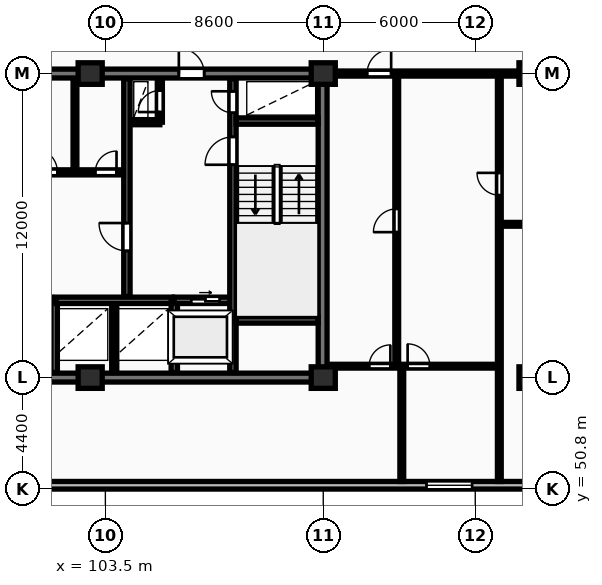
"""IFC4 building model, lengths in metres.
Left out: names, types, materials, properties, quantities, classifications, styles, units other than length and angle.
Written with IfcOpenShell. Run it as: python <this file> out.ifc"""

import sys

from ifc_helpers import new_model, si_unit, direction, frame, frame_2d, origin, origin_2d, place, context, subcontext, project, spatial, rectangle, extrude, element, fill, save


model = new_model("IFC4")
c1 = context("Model", 3, precision=1e-05, world=origin(), true_north=direction((0.0, 1.0)))
c2 = subcontext(c1, "Body", "Model", "MODEL_VIEW")
j1 = project(units=[si_unit("LENGTHUNIT", "METRE"), si_unit("PLANEANGLEUNIT", "RADIAN")], contexts=[c1])
p1 = place(None, origin())
s1 = spatial("IfcSite", under=j1, at=p1, CompositionType="ELEMENT")
p2 = place(p1, origin())
s2 = spatial("IfcBuilding", under=s1, at=p2, CompositionType="ELEMENT")
p3 = place(p2, frame((0.0, 0.0, 80.8)))
s3 = spatial("IfcBuildingStorey", under=s2, at=p3, CompositionType="ELEMENT", Elevation=80.8)
for number, where, z_axis, x_axis in (
    (1, (102.9, 55.2, 0.0), (0.0, 0.0, 1.0), (1.0, 0.0, 0.0)),
    (2, (102.9, 67.2, 0.0), (0.0, 0.0, 1.0), (1.0, 0.0, 0.0)),
    (3, (112.1, 55.2, 0.0), (0.0, 0.0, 1.0), (1.0, 0.0, 0.0)),
    (4, (112.1, 67.2, 0.0), (0.0, 0.0, 1.0), (1.0, 0.0, 0.0)),
    (5, (120.3, 55.2, 0.0), (0.0, 0.0, 1.0), (1.0, 0.0, 0.0)),
    (6, (120.3, 67.2, 0.0), (0.0, 0.0, 1.0), (1.0, 0.0, 0.0)),
):
    element("IfcColumn", number, at=place(p3, frame(where, z_axis=z_axis, x_axis=x_axis)), inside=s3, PredefinedType="COLUMN", context=c2, shape_type="SweptSolid", body=[
        extrude(rectangle(XDim=0.95, YDim=0.85, at=origin_2d()), origin(), (0.0, 0.0, 1.0), 3.25),
    ])
p4 = place(p3, frame((57.6, 50.95, 0.0), z_axis=(0.0, 0.0, 1.0), x_axis=(1.0, 0.0, 0.0)))
e7 = element("IfcWall", 7, at=p4, inside=s3, PredefinedType="STANDARD", context=c2, shape_type="SweptSolid", body=[
    extrude(rectangle(XDim=73.0, YDim=0.3, at=frame_2d((36.5, 0.0))), origin(), (0.0, 0.0, 1.0), 2.97),
])
p5 = place(p4, frame((15.225, 0.0, 0.85)))
e8 = element("IfcOpeningElement", 8, at=p5, cuts=e7, PredefinedType="OPENING", context=c2, shape_type="SweptSolid", body=[
    extrude(rectangle(XDim=1.8, YDim=1.8, at=frame_2d((0.9, 0.9))), frame((0.0, 0.16, 0.0), z_axis=(0.0, -1.0, 0.0), x_axis=(1.0, 0.0, 0.0)), (0.0, 0.0, 1.0), 0.32),
])
p6 = place(p4, frame((58.575, 0.0, 0.85)))
e9 = element("IfcOpeningElement", 9, at=p6, cuts=e7, PredefinedType="OPENING", context=c2, shape_type="SweptSolid", body=[
    extrude(rectangle(XDim=1.8, YDim=1.8, at=frame_2d((0.9, 0.9))), frame((0.0, 0.16, 0.0), z_axis=(0.0, -1.0, 0.0), x_axis=(1.0, 0.0, 0.0)), (0.0, 0.0, 1.0), 0.32),
])
p7 = place(p3, frame((75.95, 55.2, 0.0), z_axis=(0.0, 0.0, 1.0), x_axis=(1.0, 0.0, 0.0)))
e10 = element("IfcWall", 10, at=p7, inside=s3, PredefinedType="SHEAR", context=c2, shape_type="SweptSolid", body=[
    extrude(rectangle(XDim=36.3, YDim=0.35, at=frame_2d((18.15, 0.0))), origin(), (0.0, 0.0, 1.0), 3.25),
])
p8 = place(p3, frame((112.075, 55.375, 0.0), z_axis=(0.0, 0.0, 1.0), x_axis=(0.0, 1.0, 0.0)))
e11 = element("IfcWall", 11, at=p8, inside=s3, PredefinedType="SHEAR", context=c2, shape_type="SweptSolid", body=[
    extrude(rectangle(XDim=11.65, YDim=0.35, at=frame_2d((5.825, 0.0))), origin(), (0.0, 0.0, 1.0), 3.25),
])
p9 = place(p3, frame((75.95, 67.2, 0.0), z_axis=(0.0, 0.0, 1.0), x_axis=(1.0, 0.0, 0.0)))
e12 = element("IfcWall", 12, at=p9, inside=s3, PredefinedType="SHEAR", context=c2, shape_type="SweptSolid", body=[
    extrude(rectangle(XDim=36.3, YDim=0.35, at=frame_2d((18.15, 0.0))), origin(), (0.0, 0.0, 1.0), 3.25),
])
p10 = place(p9, frame((5.25, 0.0, 0.0)))
e13 = element("IfcOpeningElement", 13, at=p10, cuts=e12, PredefinedType="OPENING", context=c2, shape_type="SweptSolid", body=[
    extrude(rectangle(XDim=1.0, YDim=2.15, at=frame_2d((0.5, 1.075))), frame((0.0, 0.185, 0.0), z_axis=(0.0, -1.0, 0.0), x_axis=(1.0, 0.0, 0.0)), (0.0, 0.0, 1.0), 0.37),
])
p11 = place(p9, frame((21.6, 0.0, 0.0)))
e14 = element("IfcOpeningElement", 14, at=p11, cuts=e12, PredefinedType="OPENING", context=c2, shape_type="SweptSolid", body=[
    extrude(rectangle(XDim=1.5, YDim=2.2, at=frame_2d((0.75, 1.1))), frame((0.0, 0.185, 0.0), z_axis=(0.0, -1.0, 0.0), x_axis=(1.0, 0.0, 0.0)), (0.0, 0.0, 1.0), 0.37),
])
p12 = place(p9, frame((30.45, 0.0, 0.0)))
e15 = element("IfcOpeningElement", 15, at=p12, cuts=e12, PredefinedType="OPENING", context=c2, shape_type="SweptSolid", body=[
    extrude(rectangle(XDim=1.0, YDim=2.15, at=frame_2d((0.5, 1.075))), frame((0.0, 0.185, 0.0), z_axis=(0.0, -1.0, 0.0), x_axis=(1.0, 0.0, 0.0)), (0.0, 0.0, 1.0), 0.37),
])
p13 = place(p3, frame((101.48, 55.4, 0.0), z_axis=(0.0, 0.0, 1.0), x_axis=(0.0, 1.0, 0.0)))
e16 = element("IfcWall", 16, at=p13, inside=s3, PredefinedType="SHEAR", context=c2, shape_type="SweptSolid", body=[
    extrude(rectangle(XDim=2.85, YDim=0.25, at=frame_2d((1.425, 0.0))), origin(), (0.0, 0.0, 1.0), 3.25),
])
p14 = place(p3, frame((103.85, 55.4, 0.0), z_axis=(0.0, 0.0, 1.0), x_axis=(0.0, 1.0, 0.0)))
e17 = element("IfcWall", 17, at=p14, inside=s3, PredefinedType="PARTITIONING", context=c2, shape_type="SweptSolid", body=[
    extrude(rectangle(XDim=2.72, YDim=0.2, at=frame_2d((1.36, 0.0))), origin(), (0.0, 0.0, 1.0), 2.97),
])
p15 = place(p3, frame((101.55, 58.25, 0.0), z_axis=(0.0, 0.0, 1.0), x_axis=(1.0, 0.0, 0.0)))
e18 = element("IfcWall", 18, at=p15, inside=s3, PredefinedType="SHEAR", context=c2, shape_type="SweptSolid", body=[
    extrude(rectangle(XDim=4.6, YDim=0.25, at=frame_2d((2.3, 0.0))), origin(), (0.0, 0.0, 1.0), 3.25),
])
p16 = place(p3, frame((106.22, 55.4, 0.0), z_axis=(0.0, 0.0, 1.0), x_axis=(0.0, 1.0, 0.0)))
e19 = element("IfcWall", 19, at=p16, inside=s3, PredefinedType="SHEAR", context=c2, shape_type="SweptSolid", body=[
    extrude(rectangle(XDim=2.85, YDim=0.25, at=frame_2d((1.425, 0.0))), origin(), (0.0, 0.0, 1.0), 3.25),
])
p17 = place(p3, frame((106.22, 58.25, 0.0), z_axis=(0.0, 0.0, 1.0), x_axis=(1.0, 0.0, 0.0)))
e20 = element("IfcWall", 20, at=p17, inside=s3, PredefinedType="SHEAR", context=c2, shape_type="SweptSolid", body=[
    extrude(rectangle(XDim=2.46, YDim=0.25, at=frame_2d((1.23, 0.0))), origin(), (0.0, 0.0, 1.0), 3.25),
])
p18 = place(p17, frame((0.67, 0.0, 0.0)))
e21 = element("IfcOpeningElement", 21, at=p18, cuts=e20, PredefinedType="OPENING", context=c2, shape_type="SweptSolid", body=[
    extrude(rectangle(XDim=1.12, YDim=2.12, at=frame_2d((0.56, 1.06))), frame((0.0, 0.135, 0.0), z_axis=(0.0, -1.0, 0.0), x_axis=(1.0, 0.0, 0.0)), (0.0, 0.0, 1.0), 0.27),
])
p19 = place(p3, frame((102.3, 63.4, 0.0), z_axis=(0.0, 0.0, 1.0), x_axis=(0.0, 1.0, 0.0)))
e22 = element("IfcWall", 22, at=p19, inside=s3, PredefinedType="PARTITIONING", context=c2, shape_type="SweptSolid", body=[
    extrude(rectangle(XDim=3.6, YDim=0.15, at=frame_2d((1.8, 0.0))), origin(), (0.0, 0.0, 1.0), 2.97),
])
p20 = place(p3, frame((84.42, 63.3, 0.0), z_axis=(0.0, 0.0, 1.0), x_axis=(1.0, 0.0, 0.0)))
e23 = element("IfcWall", 23, at=p20, inside=s3, PredefinedType="PARTITIONING", context=c2, shape_type="SweptSolid", body=[
    extrude(rectangle(XDim=19.83, YDim=0.2, at=frame_2d((9.915, 0.0))), origin(), (0.0, 0.0, 1.0), 2.97),
])
p21 = place(p20, frame((1.15, 0.0, 0.0)))
e24 = element("IfcOpeningElement", 24, at=p21, cuts=e23, PredefinedType="OPENING", context=c2, shape_type="SweptSolid", body=[
    extrude(rectangle(XDim=0.85, YDim=2.05, at=frame_2d((0.425, 1.025))), frame((0.0, 0.11, 0.0), z_axis=(0.0, -1.0, 0.0), x_axis=(1.0, 0.0, 0.0)), (0.0, 0.0, 1.0), 0.22),
])
p22 = place(p20, frame((3.25, 0.0, 0.0)))
e25 = element("IfcOpeningElement", 25, at=p22, cuts=e23, PredefinedType="OPENING", context=c2, shape_type="SweptSolid", body=[
    extrude(rectangle(XDim=0.85, YDim=2.05, at=frame_2d((0.425, 1.025))), frame((0.0, 0.11, 0.0), z_axis=(0.0, -1.0, 0.0), x_axis=(1.0, 0.0, 0.0)), (0.0, 0.0, 1.0), 0.22),
])
p23 = place(p20, frame((13.08, 0.0, 0.0)))
e26 = element("IfcOpeningElement", 26, at=p23, cuts=e23, PredefinedType="OPENING", context=c2, shape_type="SweptSolid", body=[
    extrude(rectangle(XDim=1.5, YDim=2.2, at=frame_2d((0.75, 1.1))), frame((0.0, 0.11, 0.0), z_axis=(0.0, -1.0, 0.0), x_axis=(1.0, 0.0, 0.0)), (0.0, 0.0, 1.0), 0.22),
])
p24 = place(p20, frame((5.53, 0.0, 0.0)))
e27 = element("IfcOpeningElement", 27, at=p24, cuts=e23, PredefinedType="OPENING", context=c2, shape_type="SweptSolid", body=[
    extrude(rectangle(XDim=0.88, YDim=2.06, at=frame_2d((0.44, 1.03))), frame((0.0, 0.11, 0.0), z_axis=(0.0, -1.0, 0.0), x_axis=(1.0, 0.0, 0.0)), (0.0, 0.0, 1.0), 0.22),
])
p25 = place(p20, frame((7.68, 0.0, 0.0)))
e28 = element("IfcOpeningElement", 28, at=p25, cuts=e23, PredefinedType="OPENING", context=c2, shape_type="SweptSolid", body=[
    extrude(rectangle(XDim=0.88, YDim=2.06, at=frame_2d((0.44, 1.03))), frame((0.0, 0.11, 0.0), z_axis=(0.0, -1.0, 0.0), x_axis=(1.0, 0.0, 0.0)), (0.0, 0.0, 1.0), 0.22),
])
p26 = place(p20, frame((10.43, 0.0, 0.0)))
e29 = element("IfcOpeningElement", 29, at=p26, cuts=e23, PredefinedType="OPENING", context=c2, shape_type="SweptSolid", body=[
    extrude(rectangle(XDim=0.85, YDim=2.05, at=frame_2d((0.425, 1.025))), frame((0.0, 0.11, 0.0), z_axis=(0.0, -1.0, 0.0), x_axis=(1.0, 0.0, 0.0)), (0.0, 0.0, 1.0), 0.22),
])
p27 = place(p20, frame((16.23, 0.0, 0.0)))
e30 = element("IfcOpeningElement", 30, at=p27, cuts=e23, PredefinedType="OPENING", context=c2, shape_type="SweptSolid", body=[
    extrude(rectangle(XDim=0.96, YDim=2.1, at=frame_2d((0.48, 1.05))), frame((0.0, 0.11, 0.0), z_axis=(0.0, -1.0, 0.0), x_axis=(1.0, 0.0, 0.0)), (0.0, 0.0, 1.0), 0.22),
])
p28 = place(p20, frame((18.68, 0.0, 0.0)))
e31 = element("IfcOpeningElement", 31, at=p28, cuts=e23, PredefinedType="OPENING", context=c2, shape_type="SweptSolid", body=[
    extrude(rectangle(XDim=0.84, YDim=2.04, at=frame_2d((0.42, 1.02))), frame((0.0, 0.11, 0.0), z_axis=(0.0, -1.0, 0.0), x_axis=(1.0, 0.0, 0.0)), (0.0, 0.0, 1.0), 0.22),
])
p29 = place(p3, frame((104.45, 65.28, 0.0), z_axis=(0.0, 0.0, 1.0), x_axis=(1.0, 0.0, 0.0)))
e32 = element("IfcWall", 32, at=p29, inside=s3, PredefinedType="PARTITIONING", context=c2, shape_type="SweptSolid", body=[
    extrude(rectangle(XDim=1.2, YDim=0.2, at=frame_2d((0.6, 0.0))), origin(), (0.0, 0.0, 1.0), 2.97),
])
p30 = place(p3, frame((105.65, 65.28, 0.0), z_axis=(0.0, 0.0, 1.0), x_axis=(0.0, 1.0, 0.0)))
e33 = element("IfcWall", 33, at=p30, inside=s3, PredefinedType="PARTITIONING", context=c2, shape_type="SweptSolid", body=[
    extrude(rectangle(XDim=1.72, YDim=0.2, at=frame_2d((0.86, 0.0))), origin(), (0.0, 0.0, 1.0), 2.97),
])
p31 = place(p30, frame((0.4, 0.0, 0.0)))
e34 = element("IfcOpeningElement", 34, at=p31, cuts=e33, PredefinedType="OPENING", context=c2, shape_type="SweptSolid", body=[
    extrude(rectangle(XDim=0.85, YDim=2.05, at=frame_2d((0.425, 1.025))), frame((0.0, 0.11, 0.0), z_axis=(0.0, -1.0, 0.0), x_axis=(1.0, 0.0, 0.0)), (0.0, 0.0, 1.0), 0.22),
])
p32 = place(p3, frame((104.35, 58.4, 0.0), z_axis=(0.0, 0.0, 1.0), x_axis=(0.0, 1.0, 0.0)))
e35 = element("IfcWall", 35, at=p32, inside=s3, PredefinedType="SHEAR", context=c2, shape_type="SweptSolid", body=[
    extrude(rectangle(XDim=8.6, YDim=0.25, at=frame_2d((4.3, 0.0))), origin(), (0.0, 0.0, 1.0), 3.25),
])
p33 = place(p32, frame((1.8, 0.0, 0.0)))
e36 = element("IfcOpeningElement", 36, at=p33, cuts=e35, PredefinedType="OPENING", context=c2, shape_type="SweptSolid", body=[
    extrude(rectangle(XDim=1.1, YDim=2.1, at=frame_2d((0.55, 1.05))), frame((0.0, 0.135, 0.0), z_axis=(0.0, -1.0, 0.0), x_axis=(1.0, 0.0, 0.0)), (0.0, 0.0, 1.0), 0.27),
])
p34 = place(p3, frame((108.535, 55.4, 0.0), z_axis=(0.0, 0.0, 1.0), x_axis=(0.0, 1.0, 0.0)))
e37 = element("IfcWall", 37, at=p34, inside=s3, PredefinedType="SHEAR", context=c2, shape_type="SweptSolid", body=[
    extrude(rectangle(XDim=11.6, YDim=0.25, at=frame_2d((5.8, 0.0))), origin(), (0.0, 0.0, 1.0), 3.25),
])
p35 = place(p34, frame((8.2, 0.0, 0.0)))
e38 = element("IfcOpeningElement", 38, at=p35, cuts=e37, PredefinedType="OPENING", context=c2, shape_type="SweptSolid", body=[
    extrude(rectangle(XDim=1.1, YDim=2.1, at=frame_2d((0.55, 1.05))), frame((0.0, 0.135, 0.0), z_axis=(0.0, -1.0, 0.0), x_axis=(1.0, 0.0, 0.0)), (0.0, 0.0, 1.0), 0.27),
])
p36 = place(p34, frame((10.25, 0.0, 0.0)))
e39 = element("IfcOpeningElement", 39, at=p36, cuts=e37, PredefinedType="OPENING", context=c2, shape_type="SweptSolid", body=[
    extrude(rectangle(XDim=0.85, YDim=2.05, at=frame_2d((0.425, 1.025))), frame((0.0, 0.135, 0.0), z_axis=(0.0, -1.0, 0.0), x_axis=(1.0, 0.0, 0.0)), (0.0, 0.0, 1.0), 0.27),
])
for number, where, z_axis, x_axis in (
    (40, (108.66, 57.475, 0.0), (0.0, 0.0, 1.0), (1.0, 0.0, 0.0)),
    (41, (108.66, 65.325, 0.0), (0.0, 0.0, 1.0), (1.0, 0.0, 0.0)),
):
    element("IfcWall", number, at=place(p3, frame(where, z_axis=z_axis, x_axis=x_axis)), inside=s3, PredefinedType="SHEAR", context=c2, shape_type="SweptSolid", body=[
        extrude(rectangle(XDim=3.24, YDim=0.25, at=frame_2d((1.62, 0.0))), origin(), (0.0, 0.0, 1.0), 3.25),
    ])
p37 = place(p3, frame((119.05, 61.25, 0.0), z_axis=(0.0, 0.0, 1.0), x_axis=(1.0, 0.0, 0.0)))
e42 = element("IfcWall", 42, at=p37, inside=s3, PredefinedType="PARTITIONING", context=c2, shape_type="SweptSolid", body=[
    extrude(rectangle(XDim=11.55, YDim=0.15, at=frame_2d((5.775, 0.0))), origin(), (0.0, 0.0, 1.0), 2.97),
])
p38 = place(p37, frame((5.355, 0.0, 0.0)))
e43 = element("IfcOpeningElement", 43, at=p38, cuts=e42, PredefinedType="OPENING", context=c2, shape_type="SweptSolid", body=[
    extrude(rectangle(XDim=0.84, YDim=2.04, at=frame_2d((0.42, 1.02))), frame((0.0, 0.085, 0.0), z_axis=(0.0, -1.0, 0.0), x_axis=(1.0, 0.0, 0.0)), (0.0, 0.0, 1.0), 0.17),
])
p39 = place(p3, frame((119.05, 51.1, 0.0), z_axis=(0.0, 0.0, 1.0), x_axis=(0.0, 1.0, 0.0)))
e44 = element("IfcWall", 44, at=p39, inside=s3, PredefinedType="PARTITIONING", context=c2, shape_type="SweptSolid", body=[
    extrude(rectangle(XDim=16.05, YDim=0.15, at=frame_2d((8.025, 0.0))), origin(), (0.0, 0.0, 1.0), 2.97),
])
p40 = place(p39, frame((11.3, 0.0, 0.0)))
e45 = element("IfcOpeningElement", 45, at=p40, cuts=e44, PredefinedType="OPENING", context=c2, shape_type="SweptSolid", body=[
    extrude(rectangle(XDim=0.88, YDim=2.06, at=frame_2d((0.44, 1.03))), frame((0.0, 0.085, 0.0), z_axis=(0.0, -1.0, 0.0), x_axis=(1.0, 0.0, 0.0)), (0.0, 0.0, 1.0), 0.17),
])
p41 = place(p3, frame((115.0, 55.65, 0.0), z_axis=(0.0, 0.0, 1.0), x_axis=(0.0, 1.0, 0.0)))
e46 = element("IfcWall", 46, at=p41, inside=s3, PredefinedType="PARTITIONING", context=c2, shape_type="SweptSolid", body=[
    extrude(rectangle(XDim=11.5, YDim=0.15, at=frame_2d((5.75, 0.0))), origin(), (0.0, 0.0, 1.0), 2.97),
])
p42 = place(p41, frame((5.29, 0.0, 0.0)))
e47 = element("IfcOpeningElement", 47, at=p42, cuts=e46, PredefinedType="OPENING", context=c2, shape_type="SweptSolid", body=[
    extrude(rectangle(XDim=0.92, YDim=2.08, at=frame_2d((0.46, 1.04))), frame((0.0, 0.085, 0.0), z_axis=(0.0, -1.0, 0.0), x_axis=(1.0, 0.0, 0.0)), (0.0, 0.0, 1.0), 0.17),
])
p43 = place(p3, frame((115.2, 51.1, 0.0), z_axis=(0.0, 0.0, 1.0), x_axis=(0.0, 1.0, 0.0)))
e48 = element("IfcWall", 48, at=p43, inside=s3, PredefinedType="PARTITIONING", context=c2, shape_type="SweptSolid", body=[
    extrude(rectangle(XDim=4.55, YDim=0.15, at=frame_2d((2.275, 0.0))), origin(), (0.0, 0.0, 1.0), 2.97),
])
p44 = place(p3, frame((112.27, 55.65, 0.0), z_axis=(0.0, 0.0, 1.0), x_axis=(1.0, 0.0, 0.0)))
e49 = element("IfcWall", 49, at=p44, inside=s3, PredefinedType="PARTITIONING", context=c2, shape_type="SweptSolid", body=[
    extrude(rectangle(XDim=6.76, YDim=0.15, at=frame_2d((3.38, 0.0))), origin(), (0.0, 0.0, 1.0), 2.97),
])
p45 = place(p44, frame((1.64, 0.0, 0.0)))
e50 = element("IfcOpeningElement", 50, at=p45, cuts=e49, PredefinedType="OPENING", context=c2, shape_type="SweptSolid", body=[
    extrude(rectangle(XDim=0.84, YDim=2.04, at=frame_2d((0.42, 1.02))), frame((0.0, 0.085, 0.0), z_axis=(0.0, -1.0, 0.0), x_axis=(1.0, 0.0, 0.0)), (0.0, 0.0, 1.0), 0.17),
])
p46 = place(p44, frame((3.16, 0.0, 0.0)))
e51 = element("IfcOpeningElement", 51, at=p46, cuts=e49, PredefinedType="OPENING", context=c2, shape_type="SweptSolid", body=[
    extrude(rectangle(XDim=0.88, YDim=2.06, at=frame_2d((0.44, 1.03))), frame((0.0, 0.085, 0.0), z_axis=(0.0, -1.0, 0.0), x_axis=(1.0, 0.0, 0.0)), (0.0, 0.0, 1.0), 0.17),
])
p47 = place(p3, frame((112.25, 67.2, 0.0), z_axis=(0.0, 0.0, 1.0), x_axis=(1.0, 0.0, 0.0)))
e52 = element("IfcWall", 52, at=p47, inside=s3, PredefinedType="PARTITIONING", context=c2, shape_type="SweptSolid", body=[
    extrude(rectangle(XDim=18.35, YDim=0.2, at=frame_2d((9.175, 0.0))), origin(), (0.0, 0.0, 1.0), 2.433),
])
p48 = place(p47, frame((1.58, 0.0, 0.0)))
e53 = element("IfcOpeningElement", 53, at=p48, cuts=e52, PredefinedType="OPENING", context=c2, shape_type="SweptSolid", body=[
    extrude(rectangle(XDim=0.95, YDim=2.15, at=frame_2d((0.475, 1.075))), frame((0.0, 0.11, 0.0), z_axis=(0.0, -1.0, 0.0), x_axis=(1.0, 0.0, 0.0)), (0.0, 0.0, 1.0), 0.22),
])
p49 = place(p6, origin())
e54 = element("IfcWindow", 54, at=p49, inside=s3, PartitioningType="SINGLE_PANEL", PredefinedType="WINDOW", context=c2, shape_type="SweptSolid", body=[
    extrude(rectangle(XDim=1.8, YDim=1.8, at=frame_2d((0.9, 0.9))), frame((0.0, 0.03, 0.0), z_axis=(0.0, -1.0, 0.0), x_axis=(1.0, 0.0, 0.0)), (0.0, 0.0, 1.0), 0.06),
])
fill(e9, e54)
p50 = place(p12, origin())
e55 = element("IfcDoor", 55, at=p50, inside=s3, OperationType="SINGLE_SWING_LEFT", PredefinedType="DOOR", context=c2, shape_type="SweptSolid", body=[
    extrude(rectangle(XDim=1.0, YDim=2.15, at=frame_2d((0.5, 1.075))), frame((0.0, 0.025, 0.0), z_axis=(0.0, -1.0, 0.0), x_axis=(1.0, 0.0, 0.0)), (0.0, 0.0, 1.0), 0.05),
])
fill(e15, e55)
p51 = place(p18, origin())
e56 = element("IfcDoor", 56, at=p51, inside=s3, OperationType="SLIDING_TO_RIGHT", PredefinedType="DOOR", context=c2, shape_type="SweptSolid", body=[
    extrude(rectangle(XDim=1.12, YDim=2.12, at=frame_2d((0.56, 1.06))), frame((0.0, 0.025, 0.0), z_axis=(0.0, -1.0, 0.0), x_axis=(1.0, 0.0, 0.0)), (0.0, 0.0, 1.0), 0.05),
])
fill(e21, e56)
p52 = place(p27, origin())
e57 = element("IfcDoor", 57, at=p52, inside=s3, OperationType="SINGLE_SWING_LEFT", PredefinedType="DOOR", context=c2, shape_type="SweptSolid", body=[
    extrude(rectangle(XDim=0.96, YDim=2.1, at=frame_2d((0.48, 1.05))), frame((0.0, 0.025, 0.0), z_axis=(0.0, -1.0, 0.0), x_axis=(1.0, 0.0, 0.0)), (0.0, 0.0, 1.0), 0.05),
])
fill(e30, e57)
p53 = place(p28, origin())
e58 = element("IfcDoor", 58, at=p53, inside=s3, OperationType="SINGLE_SWING_RIGHT", PredefinedType="DOOR", context=c2, shape_type="SweptSolid", body=[
    extrude(rectangle(XDim=0.84, YDim=2.04, at=frame_2d((0.42, 1.02))), frame((0.0, 0.025, 0.0), z_axis=(0.0, -1.0, 0.0), x_axis=(1.0, 0.0, 0.0)), (0.0, 0.0, 1.0), 0.05),
])
fill(e31, e58)
p54 = place(p31, origin())
e59 = element("IfcDoor", 59, at=p54, inside=s3, OperationType="SINGLE_SWING_LEFT", PredefinedType="DOOR", context=c2, shape_type="SweptSolid", body=[
    extrude(rectangle(XDim=0.85, YDim=2.05, at=frame_2d((0.425, 1.025))), frame((0.0, 0.025, 0.0), z_axis=(0.0, -1.0, 0.0), x_axis=(1.0, 0.0, 0.0)), (0.0, 0.0, 1.0), 0.05),
])
fill(e34, e59)
p55 = place(p33, origin())
e60 = element("IfcDoor", 60, at=p55, inside=s3, OperationType="SINGLE_SWING_RIGHT", PredefinedType="DOOR", context=c2, shape_type="SweptSolid", body=[
    extrude(rectangle(XDim=1.1, YDim=2.1, at=frame_2d((0.55, 1.05))), frame((0.0, 0.025, 0.0), z_axis=(0.0, -1.0, 0.0), x_axis=(1.0, 0.0, 0.0)), (0.0, 0.0, 1.0), 0.05),
])
fill(e36, e60)
p56 = place(p35, origin())
e61 = element("IfcDoor", 61, at=p56, inside=s3, OperationType="SINGLE_SWING_LEFT", PredefinedType="DOOR", context=c2, shape_type="SweptSolid", body=[
    extrude(rectangle(XDim=1.1, YDim=2.1, at=frame_2d((0.55, 1.05))), frame((0.0, 0.025, 0.0), z_axis=(0.0, -1.0, 0.0), x_axis=(1.0, 0.0, 0.0)), (0.0, 0.0, 1.0), 0.05),
])
fill(e38, e61)
p57 = place(p36, origin())
e62 = element("IfcDoor", 62, at=p57, inside=s3, OperationType="SINGLE_SWING_RIGHT", PredefinedType="DOOR", context=c2, shape_type="SweptSolid", body=[
    extrude(rectangle(XDim=0.85, YDim=2.05, at=frame_2d((0.425, 1.025))), frame((0.0, 0.025, 0.0), z_axis=(0.0, -1.0, 0.0), x_axis=(1.0, 0.0, 0.0)), (0.0, 0.0, 1.0), 0.05),
])
fill(e39, e62)
p58 = place(p40, origin())
e63 = element("IfcDoor", 63, at=p58, inside=s3, OperationType="SINGLE_SWING_RIGHT", PredefinedType="DOOR", context=c2, shape_type="SweptSolid", body=[
    extrude(rectangle(XDim=0.88, YDim=2.06, at=frame_2d((0.44, 1.03))), frame((0.0, 0.025, 0.0), z_axis=(0.0, -1.0, 0.0), x_axis=(1.0, 0.0, 0.0)), (0.0, 0.0, 1.0), 0.05),
])
fill(e45, e63)
p59 = place(p42, origin())
e64 = element("IfcDoor", 64, at=p59, inside=s3, OperationType="SINGLE_SWING_LEFT", PredefinedType="DOOR", context=c2, shape_type="SweptSolid", body=[
    extrude(rectangle(XDim=0.92, YDim=2.08, at=frame_2d((0.46, 1.04))), frame((0.0, 0.025, 0.0), z_axis=(0.0, -1.0, 0.0), x_axis=(1.0, 0.0, 0.0)), (0.0, 0.0, 1.0), 0.05),
])
fill(e47, e64)
p60 = place(p45, origin())
e65 = element("IfcDoor", 65, at=p60, inside=s3, OperationType="SINGLE_SWING_RIGHT", PredefinedType="DOOR", context=c2, shape_type="SweptSolid", body=[
    extrude(rectangle(XDim=0.84, YDim=2.04, at=frame_2d((0.42, 1.02))), frame((0.0, 0.025, 0.0), z_axis=(0.0, -1.0, 0.0), x_axis=(1.0, 0.0, 0.0)), (0.0, 0.0, 1.0), 0.05),
])
fill(e50, e65)
p61 = place(p46, origin())
e66 = element("IfcDoor", 66, at=p61, inside=s3, OperationType="SINGLE_SWING_LEFT", PredefinedType="DOOR", context=c2, shape_type="SweptSolid", body=[
    extrude(rectangle(XDim=0.88, YDim=2.06, at=frame_2d((0.44, 1.03))), frame((0.0, 0.025, 0.0), z_axis=(0.0, -1.0, 0.0), x_axis=(1.0, 0.0, 0.0)), (0.0, 0.0, 1.0), 0.05),
])
fill(e51, e66)
p62 = place(p48, origin())
e67 = element("IfcDoor", 67, at=p62, inside=s3, OperationType="SINGLE_SWING_RIGHT", PredefinedType="DOOR", context=c2, shape_type="SweptSolid", body=[
    extrude(rectangle(XDim=0.95, YDim=2.15, at=frame_2d((0.475, 1.075))), frame((0.0, 0.025, 0.0), z_axis=(0.0, -1.0, 0.0), x_axis=(1.0, 0.0, 0.0)), (0.0, 0.0, 1.0), 0.05),
])
fill(e53, e67)
save(model, sys.argv[1])
